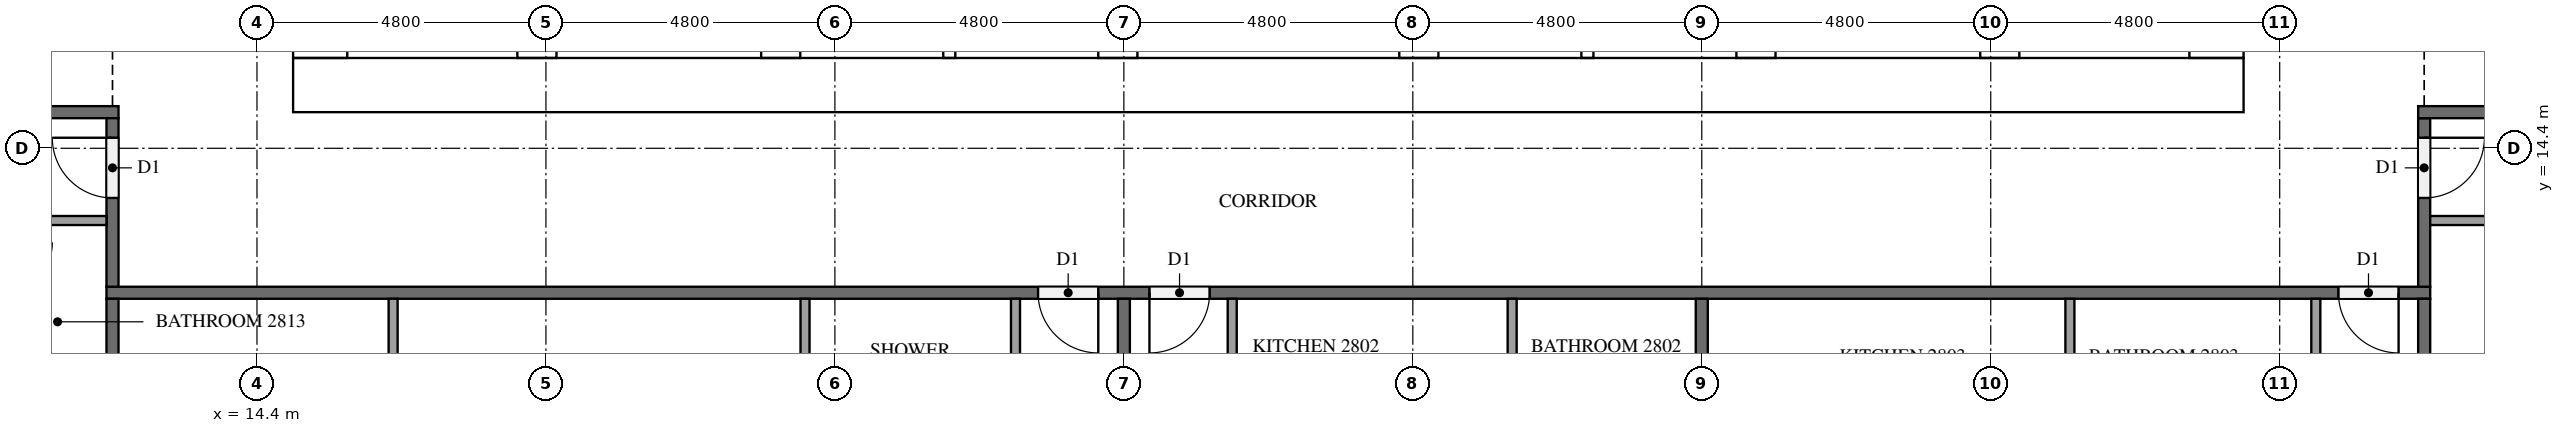
"""IFC4 building model, lengths in metres.
Left out: names, types, materials, properties, quantities, classifications, styles, units other than length and angle.
Written with IfcOpenShell. Run it as: python <this file> out.ifc"""

import sys

from ifc_helpers import new_model, si_unit, direction, frame, frame_2d, origin, place, context, subcontext, project, spatial, rectangle, extrude, element, fill, save


model = new_model("IFC4")
c1 = context("Model", 3, precision=1e-05, world=origin(), true_north=direction((0.0, 1.0)))
c2 = subcontext(c1, "Body", "Model", "MODEL_VIEW")
j1 = project(units=[si_unit("LENGTHUNIT", "METRE"), si_unit("PLANEANGLEUNIT", "RADIAN")], contexts=[c1])
p1 = place(None, origin())
s1 = spatial("IfcSite", under=j1, at=p1, CompositionType="ELEMENT")
p2 = place(p1, origin())
s2 = spatial("IfcBuilding", under=s1, at=p2, CompositionType="ELEMENT")
p3 = place(p2, frame((0.0, 0.0, 110.2)))
s3 = spatial("IfcBuildingStorey", under=s2, at=p3, CompositionType="ELEMENT", Elevation=110.2)
p4 = place(p3, frame((15.0, 15.45, 0.0), z_axis=(0.0, 0.0, 1.0), x_axis=(1.0, 0.0, 0.0)))
e1 = element("IfcWall", 1, at=p4, inside=s3, PredefinedType="SHEAR", context=c2, shape_type="SweptSolid", body=[
    extrude(rectangle(XDim=32.4, YDim=0.9, at=frame_2d((16.2, 0.0))), origin(), (0.0, 0.0, 1.0), 3.1),
])
p5 = place(p4, frame((15.3, 0.0, 0.0)))
e2 = element("IfcOpeningElement", 2, at=p5, cuts=e1, PredefinedType="OPENING", context=c2, shape_type="SweptSolid", body=[
    extrude(rectangle(XDim=1.8, YDim=2.1, at=frame_2d((0.9, 1.05))), frame((0.0, 0.46, 0.0), z_axis=(0.0, -1.0, 0.0), x_axis=(1.0, 0.0, 0.0)), (0.0, 0.0, 1.0), 0.92),
])
p6 = place(p3, frame((15.45, 15.9, 0.0), z_axis=(0.0, 0.0, 1.0), x_axis=(0.0, 1.0, 0.0)))
e3 = element("IfcWall", 3, at=p6, inside=s3, PredefinedType="SHEAR", context=c2, shape_type="SweptSolid", body=[
    extrude(rectangle(XDim=21.0, YDim=0.9, at=frame_2d((10.5, 0.0))), origin(), (0.0, 0.0, 1.0), 3.1),
])
p7 = place(p6, frame((4.86, 0.0, 0.0)))
e4 = element("IfcOpeningElement", 4, at=p7, cuts=e3, PredefinedType="OPENING", context=c2, shape_type="SweptSolid", body=[
    extrude(rectangle(XDim=1.2, YDim=2.1, at=frame_2d((0.6, 1.05))), frame((0.0, 0.46, 0.0), z_axis=(0.0, -1.0, 0.0), x_axis=(1.0, 0.0, 0.0)), (0.0, 0.0, 1.0), 0.92),
])
p8 = place(p3, frame((46.95, 15.9, 0.0), z_axis=(0.0, 0.0, 1.0), x_axis=(0.0, 1.0, 0.0)))
e5 = element("IfcWall", 5, at=p8, inside=s3, PredefinedType="SHEAR", context=c2, shape_type="SweptSolid", body=[
    extrude(rectangle(XDim=21.0, YDim=0.9, at=frame_2d((10.5, 0.0))), origin(), (0.0, 0.0, 1.0), 3.1),
])
p9 = place(p8, frame((10.2, 0.0, 0.0)))
e6 = element("IfcOpeningElement", 6, at=p9, cuts=e5, PredefinedType="OPENING", context=c2, shape_type="SweptSolid", body=[
    extrude(rectangle(XDim=1.2, YDim=2.1, at=frame_2d((0.6, 1.05))), frame((0.0, 0.46, 0.0), z_axis=(0.0, -1.0, 0.0), x_axis=(1.0, 0.0, 0.0)), (0.0, 0.0, 1.0), 0.92),
])
p10 = place(p3, frame((19.05, 15.9, 0.0), z_axis=(0.0, 0.0, 1.0), x_axis=(0.0, 1.0, 0.0)))
e7 = element("IfcWall", 7, at=p10, inside=s3, PredefinedType="SHEAR", context=c2, shape_type="SweptSolid", body=[
    extrude(rectangle(XDim=15.025, YDim=0.65, at=frame_2d((7.513, 0.0))), origin(), (0.0, 0.0, 1.0), 3.1),
])
p11 = place(p10, frame((9.55, 0.0, 0.0)))
e8 = element("IfcOpeningElement", 8, at=p11, cuts=e7, PredefinedType="OPENING", context=c2, shape_type="SweptSolid", body=[
    extrude(rectangle(XDim=1.1, YDim=2.1, at=frame_2d((0.55, 1.05))), frame((0.0, 0.335, 0.0), z_axis=(0.0, -1.0, 0.0), x_axis=(1.0, 0.0, 0.0)), (0.0, 0.0, 1.0), 0.67),
])
p12 = place(p10, frame((13.05, 0.0, 0.0)))
e9 = element("IfcOpeningElement", 9, at=p12, cuts=e7, PredefinedType="OPENING", context=c2, shape_type="SweptSolid", body=[
    extrude(rectangle(XDim=1.1, YDim=2.1, at=frame_2d((0.55, 1.05))), frame((0.0, 0.335, 0.0), z_axis=(0.0, -1.0, 0.0), x_axis=(1.0, 0.0, 0.0)), (0.0, 0.0, 1.0), 0.67),
])
p13 = place(p10, frame((0.3, 0.0, 0.0)))
e10 = element("IfcOpeningElement", 10, at=p13, cuts=e7, PredefinedType="OPENING", context=c2, shape_type="SweptSolid", body=[
    extrude(rectangle(XDim=1.2, YDim=2.1, at=frame_2d((0.6, 1.05))), frame((0.0, 0.335, 0.0), z_axis=(0.0, -1.0, 0.0), x_axis=(1.0, 0.0, 0.0)), (0.0, 0.0, 1.0), 0.67),
])
p14 = place(p3, frame((23.1, 15.9, 0.0), z_axis=(0.0, 0.0, 1.0), x_axis=(0.0, 1.0, 0.0)))
e11 = element("IfcWall", 11, at=p14, inside=s3, PredefinedType="SHEAR", context=c2, shape_type="SweptSolid", body=[
    extrude(rectangle(XDim=21.0, YDim=0.65, at=frame_2d((10.5, 0.0))), origin(), (0.0, 0.0, 1.0), 3.1),
])
p15 = place(p3, frame((39.3, 15.9, 0.0), z_axis=(0.0, 0.0, 1.0), x_axis=(0.0, 1.0, 0.0)))
e12 = element("IfcWall", 12, at=p15, inside=s3, PredefinedType="SHEAR", context=c2, shape_type="SweptSolid", body=[
    extrude(rectangle(XDim=8.35, YDim=0.65, at=frame_2d((4.175, 0.0))), origin(), (0.0, 0.0, 1.0), 3.1),
])
p16 = place(p3, frame((43.35, 15.9, 0.0), z_axis=(0.0, 0.0, 1.0), x_axis=(0.0, 1.0, 0.0)))
e13 = element("IfcWall", 13, at=p16, inside=s3, PredefinedType="SHEAR", context=c2, shape_type="SweptSolid", body=[
    extrude(rectangle(XDim=8.35, YDim=0.65, at=frame_2d((4.175, 0.0))), origin(), (0.0, 0.0, 1.0), 3.1),
])
p17 = place(p16, frame((0.3, 0.0, 0.0)))
e14 = element("IfcOpeningElement", 14, at=p17, cuts=e13, PredefinedType="OPENING", context=c2, shape_type="SweptSolid", body=[
    extrude(rectangle(XDim=1.2, YDim=2.1, at=frame_2d((0.6, 1.05))), frame((0.0, 0.335, 0.0), z_axis=(0.0, -1.0, 0.0), x_axis=(1.0, 0.0, 0.0)), (0.0, 0.0, 1.0), 0.67),
])
for number, where, z_axis, x_axis in (
    (15, (28.7, 15.9, 0.0), (0.0, 0.0, 1.0), (0.0, 1.0, 0.0)),
    (16, (33.7, 15.9, 0.0), (0.0, 0.0, 1.0), (0.0, 1.0, 0.0)),
):
    element("IfcWall", number, at=place(p3, frame(where, z_axis=z_axis, x_axis=x_axis)), inside=s3, PredefinedType="SHEAR", context=c2, shape_type="SweptSolid", body=[
        extrude(rectangle(XDim=2.525, YDim=0.65, at=frame_2d((1.263, 0.0))), origin(), (0.0, 0.0, 1.0), 3.1),
    ])
for number, where, z_axis, x_axis in (
    (17, (25.9, 15.9, 0.0), (0.0, 0.0, 1.0), (0.0, 1.0, 0.0)),
    (18, (36.5, 15.9, 0.0), (0.0, 0.0, 1.0), (0.0, 1.0, 0.0)),
):
    element("IfcWall", number, at=place(p3, frame(where, z_axis=z_axis, x_axis=x_axis)), inside=s3, PredefinedType="SOLIDWALL", context=c2, shape_type="SweptSolid", body=[
        extrude(rectangle(XDim=2.525, YDim=0.2, at=frame_2d((1.263, 0.0))), origin(), (0.0, 0.0, 1.0), 3.1),
    ])
p18 = place(p3, frame((50.5, 12.0, 0.0), z_axis=(0.0, 0.0, 1.0), x_axis=(-1.0, 0.0, 0.0)))
e19 = element("IfcWall", 19, at=p18, inside=s3, PredefinedType="PARTITIONING", context=c2, shape_type="SweptSolid", body=[
    extrude(rectangle(XDim=38.6, YDim=0.2, at=frame_2d((19.3, 0.0))), origin(), (0.0, 0.0, 1.0), 3.1),
])
p19 = place(p18, frame((22.125, 0.0, 0.0)))
e20 = element("IfcOpeningElement", 20, at=p19, cuts=e19, PredefinedType="OPENING", context=c2, shape_type="SweptSolid", body=[
    extrude(rectangle(XDim=1.0, YDim=2.1, at=frame_2d((0.5, 1.05))), frame((0.0, 0.11, 0.0), z_axis=(0.0, -1.0, 0.0), x_axis=(1.0, 0.0, 0.0)), (0.0, 0.0, 1.0), 0.22),
])
p20 = place(p18, frame((20.275, 0.0, 0.0)))
e21 = element("IfcOpeningElement", 21, at=p20, cuts=e19, PredefinedType="OPENING", context=c2, shape_type="SweptSolid", body=[
    extrude(rectangle(XDim=1.0, YDim=2.1, at=frame_2d((0.5, 1.05))), frame((0.0, 0.11, 0.0), z_axis=(0.0, -1.0, 0.0), x_axis=(1.0, 0.0, 0.0)), (0.0, 0.0, 1.0), 0.22),
])
p21 = place(p18, frame((0.525, 0.0, 0.0)))
e22 = element("IfcOpeningElement", 22, at=p21, cuts=e19, PredefinedType="OPENING", context=c2, shape_type="SweptSolid", body=[
    extrude(rectangle(XDim=1.0, YDim=2.1, at=frame_2d((0.5, 1.05))), frame((0.0, 0.11, 0.0), z_axis=(0.0, -1.0, 0.0), x_axis=(1.0, 0.0, 0.0)), (0.0, 0.0, 1.0), 0.22),
])
p22 = place(p3, frame((50.4, 14.9, 0.0), z_axis=(0.0, 0.0, 1.0), x_axis=(0.0, -1.0, 0.0)))
e23 = element("IfcWall", 23, at=p22, inside=s3, PredefinedType="PARTITIONING", context=c2, shape_type="SweptSolid", body=[
    extrude(rectangle(XDim=2.8, YDim=0.2, at=frame_2d((1.4, 0.0))), origin(), (0.0, 0.0, 1.0), 3.1),
])
p23 = place(p22, frame((0.325, 0.0, 0.0)))
e24 = element("IfcOpeningElement", 24, at=p23, cuts=e23, PredefinedType="OPENING", context=c2, shape_type="SweptSolid", body=[
    extrude(rectangle(XDim=1.0, YDim=2.1, at=frame_2d((0.5, 1.05))), frame((0.0, 0.11, 0.0), z_axis=(0.0, -1.0, 0.0), x_axis=(1.0, 0.0, 0.0)), (0.0, 0.0, 1.0), 0.22),
])
p24 = place(p3, frame((50.3, 15.0, 0.0), z_axis=(0.0, 0.0, 1.0), x_axis=(1.0, 0.0, 0.0)))
e25 = element("IfcWall", 25, at=p24, inside=s3, PredefinedType="PARTITIONING", context=c2, shape_type="SweptSolid", body=[
    extrude(rectangle(XDim=2.2, YDim=0.2, at=frame_2d((1.1, 0.0))), origin(), (0.0, 0.0, 1.0), 3.1),
])
p25 = place(p3, frame((9.9, 15.0, 0.0), z_axis=(0.0, 0.0, 1.0), x_axis=(1.0, 0.0, 0.0)))
e26 = element("IfcWall", 26, at=p25, inside=s3, PredefinedType="PARTITIONING", context=c2, shape_type="SweptSolid", body=[
    extrude(rectangle(XDim=2.2, YDim=0.2, at=frame_2d((1.1, 0.0))), origin(), (0.0, 0.0, 1.0), 3.1),
])
p26 = place(p3, frame((12.0, 12.1, 0.0), z_axis=(0.0, 0.0, 1.0), x_axis=(0.0, 1.0, 0.0)))
e27 = element("IfcWall", 27, at=p26, inside=s3, PredefinedType="PARTITIONING", context=c2, shape_type="SweptSolid", body=[
    extrude(rectangle(XDim=2.8, YDim=0.2, at=frame_2d((1.4, 0.0))), origin(), (0.0, 0.0, 1.0), 3.1),
])
p27 = place(p26, frame((1.475, 0.0, 0.0)))
e28 = element("IfcOpeningElement", 28, at=p27, cuts=e27, PredefinedType="OPENING", context=c2, shape_type="SweptSolid", body=[
    extrude(rectangle(XDim=1.0, YDim=2.1, at=frame_2d((0.5, 1.05))), frame((0.0, 0.11, 0.0), z_axis=(0.0, -1.0, 0.0), x_axis=(1.0, 0.0, 0.0)), (0.0, 0.0, 1.0), 0.22),
])
p28 = place(p3, frame((28.8, 11.9, 0.0), z_axis=(0.0, 0.0, 1.0), x_axis=(0.0, -1.0, 0.0)))
e29 = element("IfcWall", 29, at=p28, inside=s3, PredefinedType="PARTITIONING", context=c2, shape_type="SweptSolid", body=[
    extrude(rectangle(XDim=6.675, YDim=0.2, at=frame_2d((3.337, 0.0))), origin(), (0.0, 0.0, 1.0), 3.1),
])
p29 = place(p3, frame((12.0, 4.9, 0.0), z_axis=(0.0, 0.0, 1.0), x_axis=(0.0, 1.0, 0.0)))
e30 = element("IfcWall", 30, at=p29, inside=s3, PredefinedType="PARTITIONING", context=c2, shape_type="SweptSolid", body=[
    extrude(rectangle(XDim=7.0, YDim=0.2, at=frame_2d((3.5, 0.0))), origin(), (0.0, 0.0, 1.0), 3.1),
])
p30 = place(p3, frame((38.4, 11.9, 0.0), z_axis=(0.0, 0.0, 1.0), x_axis=(0.0, -1.0, 0.0)))
e31 = element("IfcWall", 31, at=p30, inside=s3, PredefinedType="PARTITIONING", context=c2, shape_type="SweptSolid", body=[
    extrude(rectangle(XDim=6.675, YDim=0.2, at=frame_2d((3.337, 0.0))), origin(), (0.0, 0.0, 1.0), 3.1),
])
p31 = place(p3, frame((50.4, 11.9, 0.0), z_axis=(0.0, 0.0, 1.0), x_axis=(0.0, -1.0, 0.0)))
e32 = element("IfcWall", 32, at=p31, inside=s3, PredefinedType="PARTITIONING", context=c2, shape_type="SweptSolid", body=[
    extrude(rectangle(XDim=7.0, YDim=0.2, at=frame_2d((3.5, 0.0))), origin(), (0.0, 0.0, 1.0), 3.1),
])
for number, where, z_axis, x_axis in (
    (33, (23.504, 11.9, 0.0), (0.0, 0.0, 1.0), (0.0, -1.0, 0.0)),
    (34, (16.662, 11.9, 0.0), (0.0, 0.0, 1.0), (0.0, -1.0, 0.0)),
):
    element("IfcWall", number, at=place(p3, frame(where, z_axis=z_axis, x_axis=x_axis)), inside=s3, PredefinedType="PARTITIONING", context=c2, shape_type="SweptSolid", body=[
        extrude(rectangle(XDim=2.375, YDim=0.15, at=frame_2d((1.188, 0.0))), origin(), (0.0, 0.0, 1.0), 3.1),
    ])
p32 = place(p3, frame((27.0, 11.9, 0.0), z_axis=(0.0, 0.0, 1.0), x_axis=(0.0, -1.0, 0.0)))
e35 = element("IfcWall", 35, at=p32, inside=s3, PredefinedType="PARTITIONING", context=c2, shape_type="SweptSolid", body=[
    extrude(rectangle(XDim=2.525, YDim=0.15, at=frame_2d((1.262, 0.0))), origin(), (0.0, 0.0, 1.0), 3.1),
])
p33 = place(p3, frame((35.25, 11.9, 0.0), z_axis=(0.0, 0.0, 1.0), x_axis=(0.0, -1.0, 0.0)))
e36 = element("IfcWall", 36, at=p33, inside=s3, PredefinedType="PARTITIONING", context=c2, shape_type="SweptSolid", body=[
    extrude(rectangle(XDim=1.775, YDim=0.15, at=frame_2d((0.887, 0.0))), origin(), (0.0, 0.0, 1.0), 3.1),
])
for number, where, z_axis, x_axis in (
    (37, (30.6, 11.9, 0.0), (0.0, 0.0, 1.0), (0.0, -1.0, 0.0)),
    (38, (44.515, 11.9, 0.0), (0.0, 0.0, 1.0), (0.0, -1.0, 0.0)),
):
    element("IfcWall", number, at=place(p3, frame(where, z_axis=z_axis, x_axis=x_axis)), inside=s3, PredefinedType="PARTITIONING", context=c2, shape_type="SweptSolid", body=[
        extrude(rectangle(XDim=1.925, YDim=0.15, at=frame_2d((0.962, 0.0))), origin(), (0.0, 0.0, 1.0), 3.1),
    ])
p34 = place(p3, frame((48.6, 11.9, 0.0), z_axis=(0.0, 0.0, 1.0), x_axis=(0.0, -1.0, 0.0)))
e39 = element("IfcWall", 39, at=p34, inside=s3, PredefinedType="PARTITIONING", context=c2, shape_type="SweptSolid", body=[
    extrude(rectangle(XDim=2.075, YDim=0.15, at=frame_2d((1.038, 0.0))), origin(), (0.0, 0.0, 1.0), 3.1),
])
p35 = place(p3, frame((50.5, 13.2, 0.0), z_axis=(0.0, 0.0, 1.0), x_axis=(1.0, 0.0, 0.0)))
e40 = element("IfcWall", 40, at=p35, inside=s3, PredefinedType="PARTITIONING", context=c2, shape_type="SweptSolid", body=[
    extrude(rectangle(XDim=4.625, YDim=0.15, at=frame_2d((2.312, 0.0))), origin(), (0.0, 0.0, 1.0), 3.1),
])
p36 = place(p3, frame((11.9, 13.2, 0.0), z_axis=(0.0, 0.0, 1.0), x_axis=(-1.0, 0.0, 0.0)))
e41 = element("IfcWall", 41, at=p36, inside=s3, PredefinedType="PARTITIONING", context=c2, shape_type="SweptSolid", body=[
    extrude(rectangle(XDim=1.775, YDim=0.15, at=frame_2d((0.887, 0.0))), origin(), (0.0, 0.0, 1.0), 3.1),
])
p37 = place(p5, frame((1.8, 0.0, 0.0), z_axis=(0.0, 0.0, 1.0), x_axis=(-1.0, 0.0, 0.0)))
e42 = element("IfcDoor", 42, at=p37, inside=s3, OperationType="DOUBLE_DOOR_SINGLE_SWING", PredefinedType="DOOR", context=c2, shape_type="SweptSolid", body=[
    extrude(rectangle(XDim=1.8, YDim=2.1, at=frame_2d((0.9, 1.05))), frame((0.0, 0.025, 0.0), z_axis=(0.0, -1.0, 0.0), x_axis=(1.0, 0.0, 0.0)), (0.0, 0.0, 1.0), 0.05),
])
fill(e2, e42)
p38 = place(p19, origin())
e43 = element("IfcDoor", 43, at=p38, inside=s3, OperationType="SINGLE_SWING_LEFT", PredefinedType="DOOR", context=c2, shape_type="SweptSolid", body=[
    extrude(rectangle(XDim=1.0, YDim=2.1, at=frame_2d((0.5, 1.05))), frame((0.0, 0.025, 0.0), z_axis=(0.0, -1.0, 0.0), x_axis=(1.0, 0.0, 0.0)), (0.0, 0.0, 1.0), 0.05),
])
fill(e20, e43)
p39 = place(p20, origin())
e44 = element("IfcDoor", 44, at=p39, inside=s3, OperationType="SINGLE_SWING_RIGHT", PredefinedType="DOOR", context=c2, shape_type="SweptSolid", body=[
    extrude(rectangle(XDim=1.0, YDim=2.1, at=frame_2d((0.5, 1.05))), frame((0.0, 0.025, 0.0), z_axis=(0.0, -1.0, 0.0), x_axis=(1.0, 0.0, 0.0)), (0.0, 0.0, 1.0), 0.05),
])
fill(e21, e44)
p40 = place(p21, origin())
e45 = element("IfcDoor", 45, at=p40, inside=s3, OperationType="SINGLE_SWING_LEFT", PredefinedType="DOOR", context=c2, shape_type="SweptSolid", body=[
    extrude(rectangle(XDim=1.0, YDim=2.1, at=frame_2d((0.5, 1.05))), frame((0.0, 0.025, 0.0), z_axis=(0.0, -1.0, 0.0), x_axis=(1.0, 0.0, 0.0)), (0.0, 0.0, 1.0), 0.05),
])
fill(e22, e45)
p41 = place(p23, origin())
e46 = element("IfcDoor", 46, at=p41, inside=s3, OperationType="SINGLE_SWING_LEFT", PredefinedType="DOOR", context=c2, shape_type="SweptSolid", body=[
    extrude(rectangle(XDim=1.0, YDim=2.1, at=frame_2d((0.5, 1.05))), frame((0.0, 0.025, 0.0), z_axis=(0.0, -1.0, 0.0), x_axis=(1.0, 0.0, 0.0)), (0.0, 0.0, 1.0), 0.05),
])
fill(e24, e46)
p42 = place(p27, origin())
e47 = element("IfcDoor", 47, at=p42, inside=s3, OperationType="SINGLE_SWING_RIGHT", PredefinedType="DOOR", context=c2, shape_type="SweptSolid", body=[
    extrude(rectangle(XDim=1.0, YDim=2.1, at=frame_2d((0.5, 1.05))), frame((0.0, 0.025, 0.0), z_axis=(0.0, -1.0, 0.0), x_axis=(1.0, 0.0, 0.0)), (0.0, 0.0, 1.0), 0.05),
])
fill(e28, e47)
save(model, sys.argv[1])
